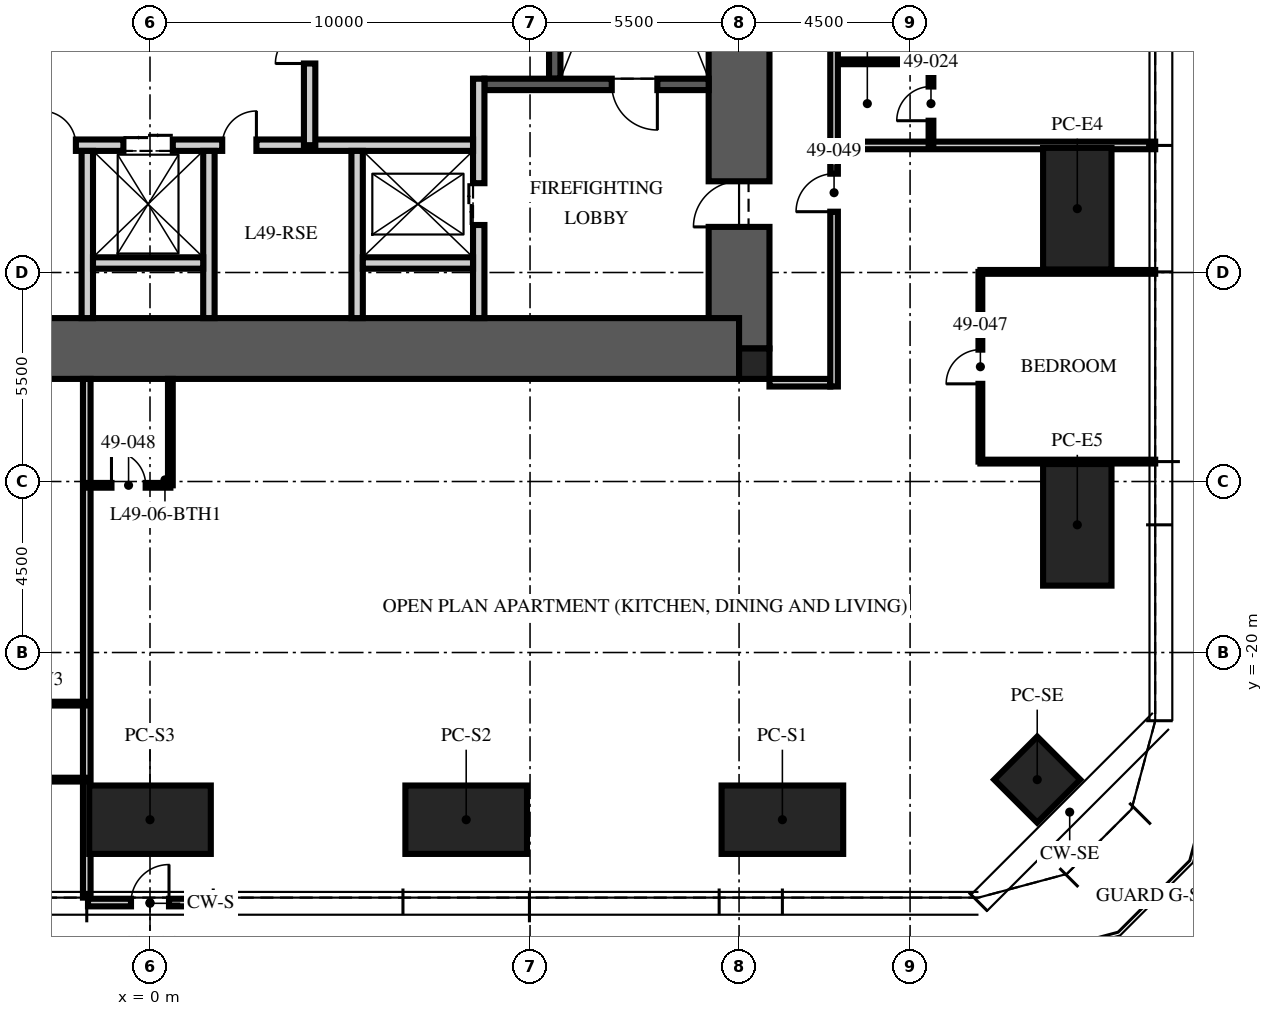
"""IFC4 building model, lengths in metres.
Left out: names, types, materials, properties, quantities, classifications, styles, units other than length and angle.
Written with IfcOpenShell. Run it as: python <this file> out.ifc"""

import sys

from ifc_helpers import new_model, si_unit, direction, frame, frame_2d, origin, origin_2d, place, context, subcontext, project, spatial, rectangle, hollow_rectangle, extrude, element, fill, save


model = new_model("IFC4")
c1 = context("Model", 3, precision=1e-05, world=origin(), true_north=direction((0.0, 1.0)))
c2 = subcontext(c1, "Body", "Model", "MODEL_VIEW")
j1 = project(units=[si_unit("LENGTHUNIT", "METRE"), si_unit("PLANEANGLEUNIT", "RADIAN")], contexts=[c1])
p1 = place(None, origin())
s1 = spatial("IfcSite", under=j1, at=p1, CompositionType="ELEMENT")
p2 = place(p1, origin())
s2 = spatial("IfcBuilding", under=s1, at=p2, CompositionType="ELEMENT")
p3 = place(p2, frame((0.0, 0.0, 199.5)))
s3 = spatial("IfcBuildingStorey", under=s2, at=p3, CompositionType="ELEMENT", Elevation=199.5)
p4 = place(p3, frame((15.5, -12.0, -0.25), z_axis=(0.0, 0.0, 1.0), x_axis=(0.0, 1.0, 0.0)))
e1 = element("IfcWall", 1, at=p4, inside=s3, PredefinedType="SHEAR", context=c2, shape_type="SweptSolid", body=[
    extrude(rectangle(XDim=24.0, YDim=1.6, at=frame_2d((12.0, 0.0))), origin(), (0.0, 0.0, 1.0), 3.75),
])
p5 = place(p4, frame((3.2, 0.0, 0.25)))
e2 = element("IfcOpeningElement", 2, at=p5, cuts=e1, PredefinedType="OPENING", context=c2, shape_type="SweptSolid", body=[
    extrude(rectangle(XDim=1.2, YDim=2.1, at=frame_2d((0.6, 1.05))), frame((0.0, 0.81, 0.0), z_axis=(0.0, -1.0, 0.0), x_axis=(1.0, 0.0, 0.0)), (0.0, 0.0, 1.0), 1.62),
])
p6 = place(p4, frame((19.3, 0.0, 0.25)))
e3 = element("IfcOpeningElement", 3, at=p6, cuts=e1, PredefinedType="OPENING", context=c2, shape_type="SweptSolid", body=[
    extrude(rectangle(XDim=1.8, YDim=2.1, at=frame_2d((0.9, 1.05))), frame((0.0, 0.81, 0.0), z_axis=(0.0, -1.0, 0.0), x_axis=(1.0, 0.0, 0.0)), (0.0, 0.0, 1.0), 1.62),
])
p7 = place(p3, frame((-15.5, -12.0, -0.25), z_axis=(0.0, 0.0, 1.0), x_axis=(1.0, 0.0, 0.0)))
e4 = element("IfcWall", 4, at=p7, inside=s3, PredefinedType="SHEAR", context=c2, shape_type="SweptSolid", body=[
    extrude(rectangle(XDim=31.0, YDim=1.6, at=frame_2d((15.5, 0.0))), origin(), (0.0, 0.0, 1.0), 3.75),
])
p8 = place(p3, frame((15.9, -12.4, -0.25), z_axis=(0.0, 0.0, 1.0), x_axis=(1.0, 0.0, 0.0)))
e5 = element("IfcColumn", 5, at=p8, inside=s3, PredefinedType="COLUMN", context=c2, shape_type="SweptSolid", body=[
    extrude(rectangle(XDim=0.8, YDim=0.8, at=origin_2d()), origin(), (0.0, 0.0, 1.0), 3.75),
])
p9 = place(p3, frame((24.4, -8.32, -0.07), z_axis=(0.0, 0.0, 1.0), x_axis=(0.0, 1.0, 0.0)))
e6 = element("IfcColumn", 6, at=p9, inside=s3, PredefinedType="COLUMN", context=c2, shape_type="SweptSolid", body=[
    extrude(hollow_rectangle(XDim=3.2, YDim=1.8, WallThickness=0.2, at=origin_2d()), origin(), (0.0, 0.0, 1.0), 3.82),
])
for number, where, z_axis, x_axis in (
    (7, (24.4, -16.64, 0.08), (0.0, 0.0, 1.0), (0.0, 1.0, 0.0)),
    (8, (16.64, -24.4, 0.08), (0.0, 0.0, 1.0), (1.0, 0.0, 0.0)),
):
    element("IfcColumn", number, at=place(p3, frame(where, z_axis=z_axis, x_axis=x_axis)), inside=s3, PredefinedType="COLUMN", context=c2, shape_type="SweptSolid", body=[
        extrude(hollow_rectangle(XDim=3.2, YDim=1.8, WallThickness=0.2, at=origin_2d()), origin(), (0.0, 0.0, 1.0), 3.67),
    ])
p10 = place(p3, frame((8.32, -24.4, -0.07), z_axis=(0.0, 0.0, 1.0), x_axis=(1.0, 0.0, 0.0)))
e9 = element("IfcColumn", 9, at=p10, inside=s3, PredefinedType="COLUMN", context=c2, shape_type="SweptSolid", body=[
    extrude(hollow_rectangle(XDim=3.2, YDim=1.8, WallThickness=0.2, at=origin_2d()), origin(), (0.0, 0.0, 1.0), 3.82),
])
p11 = place(p3, frame((0.0, -24.4, -0.23), z_axis=(0.0, 0.0, 1.0), x_axis=(1.0, 0.0, 0.0)))
e10 = element("IfcColumn", 10, at=p11, inside=s3, PredefinedType="COLUMN", context=c2, shape_type="SweptSolid", body=[
    extrude(hollow_rectangle(XDim=3.2, YDim=1.8, WallThickness=0.2, at=origin_2d()), origin(), (0.0, 0.0, 1.0), 3.98),
])
p12 = place(p3, frame((23.346, -23.346, -0.19), z_axis=(0.0, 0.0, 1.0), x_axis=(0.707106781187, 0.707106781187, 0.0)))
e11 = element("IfcColumn", 11, at=p12, inside=s3, PredefinedType="COLUMN", context=c2, shape_type="SweptSolid", body=[
    extrude(hollow_rectangle(XDim=1.6, YDim=1.6, WallThickness=0.1, at=origin_2d()), origin(), (0.0, 0.0, 1.0), 3.94),
])
p13 = place(p3, frame((-1.632, -26.58, 0.0), z_axis=(0.0, 0.0, 1.0), x_axis=(1.0, 0.0, 0.0)))
e12 = element("IfcWall", 12, at=p13, inside=s3, PredefinedType="ELEMENTEDWALL", context=c2, shape_type="SweptSolid", body=[
    extrude(rectangle(XDim=3.263, YDim=0.2, at=frame_2d((1.632, 0.0))), origin(), (0.0, 0.0, 1.0), 3.75),
])
p14 = place(p13, frame((1.132, 0.0, 0.0)))
e13 = element("IfcOpeningElement", 13, at=p14, cuts=e12, PredefinedType="OPENING", context=c2, shape_type="SweptSolid", body=[
    extrude(rectangle(XDim=1.0, YDim=2.4, at=frame_2d((0.5, 1.2))), frame((0.0, 0.11, 0.0), z_axis=(0.0, -1.0, 0.0), x_axis=(1.0, 0.0, 0.0)), (0.0, 0.0, 1.0), 0.22),
])
p15 = place(p3, frame((10.65, -4.9, 0.0), z_axis=(0.0, 0.0, 1.0), x_axis=(0.0, 1.0, 0.0)))
e14 = element("IfcWall", 14, at=p15, inside=s3, PredefinedType="SOLIDWALL", context=c2, shape_type="SweptSolid", body=[
    extrude(rectangle(XDim=10.1, YDim=0.3, at=frame_2d((5.05, 0.0))), origin(), (0.0, 0.0, 1.0), 3.5),
])
p16 = place(p3, frame((14.7, -5.05, 0.0), z_axis=(0.0, 0.0, 1.0), x_axis=(-1.0, 0.0, 0.0)))
e15 = element("IfcWall", 15, at=p16, inside=s3, PredefinedType="SOLIDWALL", context=c2, shape_type="SweptSolid", body=[
    extrude(rectangle(XDim=5.9, YDim=0.3, at=frame_2d((2.95, 0.0))), origin(), (0.0, 0.0, 1.0), 3.5),
])
p17 = place(p16, frame((1.35, 0.0, 0.0)))
e16 = element("IfcOpeningElement", 16, at=p17, cuts=e15, PredefinedType="OPENING", context=c2, shape_type="SweptSolid", body=[
    extrude(rectangle(XDim=1.2, YDim=2.1, at=frame_2d((0.6, 1.05))), frame((0.0, 0.16, 0.0), z_axis=(0.0, -1.0, 0.0), x_axis=(1.0, 0.0, 0.0)), (0.0, 0.0, 1.0), 0.32),
])
p18 = place(p3, frame((8.65, -11.2, 0.0), z_axis=(0.0, 0.0, 1.0), x_axis=(0.0, 1.0, 0.0)))
e17 = element("IfcWall", 17, at=p18, inside=s3, PredefinedType="PARTITIONING", context=c2, shape_type="SweptSolid", body=[
    extrude(rectangle(XDim=6.3, YDim=0.3, at=frame_2d((3.15, 0.0))), origin(), (0.0, 0.0, 1.0), 3.5),
])
p19 = place(p18, frame((2.45, 0.0, 0.0)))
e18 = element("IfcOpeningElement", 18, at=p19, cuts=e17, PredefinedType="OPENING", context=c2, shape_type="SweptSolid", body=[
    extrude(rectangle(XDim=1.1, YDim=2.1, at=frame_2d((0.55, 1.05))), frame((0.0, 0.16, 0.0), z_axis=(0.0, -1.0, 0.0), x_axis=(1.0, 0.0, 0.0)), (0.0, 0.0, 1.0), 0.32),
])
p20 = place(p3, frame((-8.5, -6.65, 0.0), z_axis=(0.0, 0.0, 1.0), x_axis=(1.0, 0.0, 0.0)))
e19 = element("IfcWall", 19, at=p20, inside=s3, PredefinedType="PARTITIONING", context=c2, shape_type="SweptSolid", body=[
    extrude(rectangle(XDim=17.0, YDim=0.3, at=frame_2d((8.5, 0.0))), origin(), (0.0, 0.0, 1.0), 3.5),
])
p21 = place(p20, frame((7.8, 0.0, 0.0)))
e20 = element("IfcOpeningElement", 20, at=p21, cuts=e19, PredefinedType="OPENING", context=c2, shape_type="SweptSolid", body=[
    extrude(rectangle(XDim=1.3, YDim=2.4, at=frame_2d((0.65, 1.2))), frame((0.0, 0.16, 0.0), z_axis=(0.0, -1.0, 0.0), x_axis=(1.0, 0.0, 0.0)), (0.0, 0.0, 1.0), 0.32),
])
p22 = place(p20, frame((5.65, 0.0, 0.0)))
e21 = element("IfcOpeningElement", 21, at=p22, cuts=e19, PredefinedType="OPENING", context=c2, shape_type="SweptSolid", body=[
    extrude(rectangle(XDim=0.9, YDim=2.1, at=frame_2d((0.45, 1.05))), frame((0.0, 0.16, 0.0), z_axis=(0.0, -1.0, 0.0), x_axis=(1.0, 0.0, 0.0)), (0.0, 0.0, 1.0), 0.32),
])
p23 = place(p20, frame((10.4, 0.0, 0.0)))
e22 = element("IfcOpeningElement", 22, at=p23, cuts=e19, PredefinedType="OPENING", context=c2, shape_type="SweptSolid", body=[
    extrude(rectangle(XDim=0.9, YDim=2.1, at=frame_2d((0.45, 1.05))), frame((0.0, 0.16, 0.0), z_axis=(0.0, -1.0, 0.0), x_axis=(1.0, 0.0, 0.0)), (0.0, 0.0, 1.0), 0.32),
])
for number, where, z_axis, x_axis in (
    (23, (-1.65, -11.2, 0.0), (0.0, 0.0, 1.0), (0.0, 1.0, 0.0)),
    (24, (1.55, -11.2, 0.0), (0.0, 0.0, 1.0), (0.0, 1.0, 0.0)),
    (25, (5.45, -11.2, 0.0), (0.0, 0.0, 1.0), (0.0, 1.0, 0.0)),
):
    element("IfcWall", number, at=place(p3, frame(where, z_axis=z_axis, x_axis=x_axis)), inside=s3, PredefinedType="PARTITIONING", context=c2, shape_type="SweptSolid", body=[
        extrude(rectangle(XDim=4.4, YDim=0.3, at=frame_2d((2.2, 0.0))), origin(), (0.0, 0.0, 1.0), 3.5),
    ])
for number, where, z_axis, x_axis in (
    (26, (-1.5, -9.75, 0.0), (0.0, 0.0, 1.0), (1.0, 0.0, 0.0)),
    (27, (5.6, -9.75, 0.0), (0.0, 0.0, 1.0), (1.0, 0.0, 0.0)),
):
    element("IfcWall", number, at=place(p3, frame(where, z_axis=z_axis, x_axis=x_axis)), inside=s3, PredefinedType="PARTITIONING", context=c2, shape_type="SweptSolid", body=[
        extrude(rectangle(XDim=2.9, YDim=0.3, at=frame_2d((1.45, 0.0))), origin(), (0.0, 0.0, 1.0), 3.5),
    ])
p24 = place(p3, frame((4.2, -6.65, 0.0), z_axis=(0.0, 0.0, 1.0), x_axis=(0.0, 1.0, 0.0)))
e28 = element("IfcWall", 28, at=p24, inside=s3, PredefinedType="PARTITIONING", context=c2, shape_type="SweptSolid", body=[
    extrude(rectangle(XDim=10.25, YDim=0.3, at=frame_2d((5.125, 0.0))), origin(), (0.0, 0.0, 1.0), 3.5),
])
p25 = place(p24, frame((2.15, 0.0, 0.0)))
e29 = element("IfcOpeningElement", 29, at=p25, cuts=e28, PredefinedType="OPENING", context=c2, shape_type="SweptSolid", body=[
    extrude(rectangle(XDim=0.9, YDim=2.1, at=frame_2d((0.45, 1.05))), frame((0.0, 0.16, 0.0), z_axis=(0.0, -1.0, 0.0), x_axis=(1.0, 0.0, 0.0)), (0.0, 0.0, 1.0), 0.32),
])
p26 = place(p24, frame((7.275, 0.0, 0.0)))
e30 = element("IfcOpeningElement", 30, at=p26, cuts=e28, PredefinedType="OPENING", context=c2, shape_type="SweptSolid", body=[
    extrude(rectangle(XDim=0.9, YDim=2.1, at=frame_2d((0.45, 1.05))), frame((0.0, 0.16, 0.0), z_axis=(0.0, -1.0, 0.0), x_axis=(1.0, 0.0, 0.0)), (0.0, 0.0, 1.0), 0.32),
])
p27 = place(p3, frame((16.3, -12.9, 0.0), z_axis=(0.0, 0.0, 1.0), x_axis=(1.0, 0.0, 0.0)))
e31 = element("IfcWall", 31, at=p27, inside=s3, PredefinedType="PARTITIONING", context=c2, shape_type="SweptSolid", body=[
    extrude(rectangle(XDim=1.6, YDim=0.2, at=frame_2d((0.8, 0.0))), origin(), (0.0, 0.0, 1.0), 2.3),
])
p28 = place(p3, frame((18.1, -6.656, 0.0), z_axis=(0.0, 0.0, 1.0), x_axis=(1.0, 0.0, 0.0)))
e32 = element("IfcWall", 32, at=p28, inside=s3, PredefinedType="PARTITIONING", context=c2, shape_type="SweptSolid", body=[
    extrude(rectangle(XDim=8.35, YDim=0.2, at=frame_2d((4.175, 0.0))), origin(), (0.0, 0.0, 1.0), 2.91),
])
p29 = place(p3, frame((-1.664, -12.8, 0.0), z_axis=(0.0, 0.0, 1.0), x_axis=(0.0, -1.0, 0.0)))
e33 = element("IfcWall", 33, at=p29, inside=s3, PredefinedType="PARTITIONING", context=c2, shape_type="SweptSolid", body=[
    extrude(rectangle(XDim=13.65, YDim=0.2, at=frame_2d((6.825, 0.0))), origin(), (0.0, 0.0, 1.0), 2.91),
])
for number, where, z_axis, x_axis in (
    (34, (21.85, -14.976, 0.0), (0.0, 0.0, 1.0), (1.0, 0.0, 0.0)),
    (35, (21.85, -9.984, 0.0), (0.0, 0.0, 1.0), (1.0, 0.0, 0.0)),
):
    element("IfcWall", number, at=place(p3, frame(where, z_axis=z_axis, x_axis=x_axis)), inside=s3, PredefinedType="PARTITIONING", context=c2, shape_type="SweptSolid", body=[
        extrude(rectangle(XDim=4.6, YDim=0.1, at=frame_2d((2.3, 0.0))), origin(), (0.0, 0.0, 1.0), 2.91),
    ])
p30 = place(p3, frame((20.55, -6.656, 0.0), z_axis=(0.0, 0.0, 1.0), x_axis=(0.0, 1.0, 0.0)))
e36 = element("IfcWall", 36, at=p30, inside=s3, PredefinedType="PARTITIONING", context=c2, shape_type="SweptSolid", body=[
    extrude(rectangle(XDim=2.2, YDim=0.125, at=frame_2d((1.1, 0.0))), origin(), (0.0, 0.0, 1.0), 3.5),
])
p31 = place(p30, frame((0.65, 0.0, 0.0)))
e37 = element("IfcOpeningElement", 37, at=p31, cuts=e36, PredefinedType="OPENING", context=c2, shape_type="SweptSolid", body=[
    extrude(rectangle(XDim=0.9, YDim=2.1, at=frame_2d((0.45, 1.05))), frame((0.0, 0.073, 0.0), z_axis=(0.0, -1.0, 0.0), x_axis=(1.0, 0.0, 0.0)), (0.0, 0.0, 1.0), 0.145),
])
p32 = place(p3, frame((18.1, -4.456, 0.0), z_axis=(0.0, 0.0, 1.0), x_axis=(1.0, 0.0, 0.0)))
e38 = element("IfcWall", 38, at=p32, inside=s3, PredefinedType="PARTITIONING", context=c2, shape_type="SweptSolid", body=[
    extrude(rectangle(XDim=2.45, YDim=0.125, at=frame_2d((1.225, 0.0))), origin(), (0.0, 0.0, 1.0), 3.5),
])
p33 = place(p3, frame((-6.656, -23.345, 0.0), z_axis=(0.0, 0.0, 1.0), x_axis=(1.0, 0.0, 0.0)))
e39 = element("IfcWall", 39, at=p33, inside=s3, PredefinedType="PARTITIONING", context=c2, shape_type="SweptSolid", body=[
    extrude(rectangle(XDim=4.992, YDim=0.1, at=frame_2d((2.496, 0.0))), origin(), (0.0, 0.0, 1.0), 2.81),
])
p34 = place(p33, frame((0.15, 0.0, 0.0)))
e40 = element("IfcOpeningElement", 40, at=p34, cuts=e39, PredefinedType="OPENING", context=c2, shape_type="SweptSolid", body=[
    extrude(rectangle(XDim=0.9, YDim=2.1, at=frame_2d((0.45, 1.05))), frame((0.0, 0.06, 0.0), z_axis=(0.0, -1.0, 0.0), x_axis=(1.0, 0.0, 0.0)), (0.0, 0.0, 1.0), 0.12),
])
p35 = place(p33, frame((2.646, 0.0, 0.0)))
e41 = element("IfcOpeningElement", 41, at=p35, cuts=e39, PredefinedType="OPENING", context=c2, shape_type="SweptSolid", body=[
    extrude(rectangle(XDim=0.9, YDim=2.1, at=frame_2d((0.45, 1.05))), frame((0.0, 0.06, 0.0), z_axis=(0.0, -1.0, 0.0), x_axis=(1.0, 0.0, 0.0)), (0.0, 0.0, 1.0), 0.12),
])
p36 = place(p3, frame((-5.456, -21.345, 0.0), z_axis=(0.0, 0.0, 1.0), x_axis=(1.0, 0.0, 0.0)))
e42 = element("IfcWall", 42, at=p36, inside=s3, PredefinedType="PARTITIONING", context=c2, shape_type="SweptSolid", body=[
    extrude(rectangle(XDim=3.792, YDim=0.1, at=frame_2d((1.896, 0.0))), origin(), (0.0, 0.0, 1.0), 2.81),
])
p37 = place(p3, frame((21.85, -14.976, 0.0), z_axis=(0.0, 0.0, 1.0), x_axis=(0.0, 1.0, 0.0)))
e43 = element("IfcWall", 43, at=p37, inside=s3, PredefinedType="PARTITIONING", context=c2, shape_type="SweptSolid", body=[
    extrude(rectangle(XDim=4.992, YDim=0.1, at=frame_2d((2.496, 0.0))), origin(), (0.0, 0.0, 1.0), 2.81),
])
p38 = place(p37, frame((2.046, 0.0, 0.0)))
e44 = element("IfcOpeningElement", 44, at=p38, cuts=e43, PredefinedType="OPENING", context=c2, shape_type="SweptSolid", body=[
    extrude(rectangle(XDim=0.9, YDim=2.1, at=frame_2d((0.45, 1.05))), frame((0.0, 0.06, 0.0), z_axis=(0.0, -1.0, 0.0), x_axis=(1.0, 0.0, 0.0)), (0.0, 0.0, 1.0), 0.12),
])
p39 = place(p3, frame((-1.664, -15.6, 0.0), z_axis=(0.0, 0.0, 1.0), x_axis=(1.0, 0.0, 0.0)))
e45 = element("IfcWall", 45, at=p39, inside=s3, PredefinedType="PARTITIONING", context=c2, shape_type="SweptSolid", body=[
    extrude(rectangle(XDim=2.2, YDim=0.125, at=frame_2d((1.1, 0.0))), origin(), (0.0, 0.0, 1.0), 2.6),
])
p40 = place(p39, frame((0.65, 0.0, 0.0)))
e46 = element("IfcOpeningElement", 46, at=p40, cuts=e45, PredefinedType="OPENING", context=c2, shape_type="SweptSolid", body=[
    extrude(rectangle(XDim=0.9, YDim=2.1, at=frame_2d((0.45, 1.05))), frame((0.0, 0.073, 0.0), z_axis=(0.0, -1.0, 0.0), x_axis=(1.0, 0.0, 0.0)), (0.0, 0.0, 1.0), 0.145),
])
p41 = place(p3, frame((0.536, -12.8, 0.0), z_axis=(0.0, 0.0, 1.0), x_axis=(0.0, -1.0, 0.0)))
e47 = element("IfcWall", 47, at=p41, inside=s3, PredefinedType="PARTITIONING", context=c2, shape_type="SweptSolid", body=[
    extrude(rectangle(XDim=2.8, YDim=0.125, at=frame_2d((1.4, 0.0))), origin(), (0.0, 0.0, 1.0), 3.5),
])
p42 = place(p3, frame((18.0, -13.0, 0.0), z_axis=(0.0, 0.0, 1.0), x_axis=(0.0, 1.0, 0.0)))
e48 = element("IfcWall", 48, at=p42, inside=s3, PredefinedType="PARTITIONING", context=c2, shape_type="SweptSolid", body=[
    extrude(rectangle(XDim=26.0, YDim=0.2, at=frame_2d((13.0, 0.0))), origin(), (0.0, 0.0, 1.0), 2.6),
])
p43 = place(p42, frame((21.364, 0.0, 0.0)))
e49 = element("IfcOpeningElement", 49, at=p43, cuts=e48, PredefinedType="OPENING", context=c2, shape_type="SweptSolid", body=[
    extrude(rectangle(XDim=1.0, YDim=2.2, at=frame_2d((0.5, 1.1))), frame((0.0, 0.11, 0.0), z_axis=(0.0, -1.0, 0.0), x_axis=(1.0, 0.0, 0.0)), (0.0, 0.0, 1.0), 0.22),
])
p44 = place(p42, frame((23.754, 0.0, 0.0)))
e50 = element("IfcOpeningElement", 50, at=p44, cuts=e48, PredefinedType="OPENING", context=c2, shape_type="SweptSolid", body=[
    extrude(rectangle(XDim=1.0, YDim=2.2, at=frame_2d((0.5, 1.1))), frame((0.0, 0.11, 0.0), z_axis=(0.0, -1.0, 0.0), x_axis=(1.0, 0.0, 0.0)), (0.0, 0.0, 1.0), 0.22),
])
p45 = place(p42, frame((4.6, 0.0, 0.0)))
e51 = element("IfcOpeningElement", 51, at=p45, cuts=e48, PredefinedType="OPENING", context=c2, shape_type="SweptSolid", body=[
    extrude(rectangle(XDim=1.0, YDim=2.2, at=frame_2d((0.5, 1.1))), frame((0.0, 0.11, 0.0), z_axis=(0.0, -1.0, 0.0), x_axis=(1.0, 0.0, 0.0)), (0.0, 0.0, 1.0), 0.22),
])
p46 = place(p14, origin())
e52 = element("IfcDoor", 52, at=p46, inside=s3, OperationType="SINGLE_SWING_LEFT", PredefinedType="DOOR", context=c2, shape_type="SweptSolid", body=[
    extrude(rectangle(XDim=1.0, YDim=2.4, at=frame_2d((0.5, 1.2))), frame((0.0, 0.025, 0.0), z_axis=(0.0, -1.0, 0.0), x_axis=(1.0, 0.0, 0.0)), (0.0, 0.0, 1.0), 0.05),
])
fill(e13, e52)
p47 = place(p17, origin())
e53 = element("IfcDoor", 53, at=p47, inside=s3, OperationType="SINGLE_SWING_LEFT", PredefinedType="DOOR", context=c2, shape_type="SweptSolid", body=[
    extrude(rectangle(XDim=1.2, YDim=2.1, at=frame_2d((0.6, 1.05))), frame((0.0, 0.025, 0.0), z_axis=(0.0, -1.0, 0.0), x_axis=(1.0, 0.0, 0.0)), (0.0, 0.0, 1.0), 0.05),
])
fill(e16, e53)
p48 = place(p5, origin())
e54 = element("IfcDoor", 54, at=p48, inside=s3, OperationType="SINGLE_SWING_LEFT", PredefinedType="DOOR", context=c2, shape_type="SweptSolid", body=[
    extrude(rectangle(XDim=1.2, YDim=2.1, at=frame_2d((0.6, 1.05))), frame((0.0, 0.025, 0.0), z_axis=(0.0, -1.0, 0.0), x_axis=(1.0, 0.0, 0.0)), (0.0, 0.0, 1.0), 0.05),
])
fill(e2, e54)
p49 = place(p19, origin())
e55 = element("IfcDoor", 55, at=p49, inside=s3, OperationType="DOUBLE_DOOR_SLIDING", PredefinedType="DOOR", context=c2, shape_type="SweptSolid", body=[
    extrude(rectangle(XDim=1.1, YDim=2.1, at=frame_2d((0.55, 1.05))), frame((0.0, 0.025, 0.0), z_axis=(0.0, -1.0, 0.0), x_axis=(1.0, 0.0, 0.0)), (0.0, 0.0, 1.0), 0.05),
])
fill(e18, e55)
p50 = place(p21, origin())
e56 = element("IfcDoor", 56, at=p50, inside=s3, OperationType="DOUBLE_DOOR_SLIDING", PredefinedType="DOOR", context=c2, shape_type="SweptSolid", body=[
    extrude(rectangle(XDim=1.3, YDim=2.4, at=frame_2d((0.65, 1.2))), frame((0.0, 0.025, 0.0), z_axis=(0.0, -1.0, 0.0), x_axis=(1.0, 0.0, 0.0)), (0.0, 0.0, 1.0), 0.05),
])
fill(e20, e56)
p51 = place(p22, origin())
e57 = element("IfcDoor", 57, at=p51, inside=s3, OperationType="SINGLE_SWING_LEFT", PredefinedType="DOOR", context=c2, shape_type="SweptSolid", body=[
    extrude(rectangle(XDim=0.9, YDim=2.1, at=frame_2d((0.45, 1.05))), frame((0.0, 0.025, 0.0), z_axis=(0.0, -1.0, 0.0), x_axis=(1.0, 0.0, 0.0)), (0.0, 0.0, 1.0), 0.05),
])
fill(e21, e57)
p52 = place(p23, origin())
e58 = element("IfcDoor", 58, at=p52, inside=s3, OperationType="SINGLE_SWING_RIGHT", PredefinedType="DOOR", context=c2, shape_type="SweptSolid", body=[
    extrude(rectangle(XDim=0.9, YDim=2.1, at=frame_2d((0.45, 1.05))), frame((0.0, 0.025, 0.0), z_axis=(0.0, -1.0, 0.0), x_axis=(1.0, 0.0, 0.0)), (0.0, 0.0, 1.0), 0.05),
])
fill(e22, e58)
p53 = place(p25, origin())
e59 = element("IfcDoor", 59, at=p53, inside=s3, OperationType="SINGLE_SWING_LEFT", PredefinedType="DOOR", context=c2, shape_type="SweptSolid", body=[
    extrude(rectangle(XDim=0.9, YDim=2.1, at=frame_2d((0.45, 1.05))), frame((0.0, 0.025, 0.0), z_axis=(0.0, -1.0, 0.0), x_axis=(1.0, 0.0, 0.0)), (0.0, 0.0, 1.0), 0.05),
])
fill(e29, e59)
p54 = place(p31, origin())
e60 = element("IfcDoor", 60, at=p54, inside=s3, OperationType="SINGLE_SWING_LEFT", PredefinedType="DOOR", context=c2, shape_type="SweptSolid", body=[
    extrude(rectangle(XDim=0.9, YDim=2.1, at=frame_2d((0.45, 1.05))), frame((0.0, 0.025, 0.0), z_axis=(0.0, -1.0, 0.0), x_axis=(1.0, 0.0, 0.0)), (0.0, 0.0, 1.0), 0.05),
])
fill(e37, e60)
p55 = place(p38, origin())
e61 = element("IfcDoor", 61, at=p55, inside=s3, OperationType="SINGLE_SWING_LEFT", PredefinedType="DOOR", context=c2, shape_type="SweptSolid", body=[
    extrude(rectangle(XDim=0.9, YDim=2.1, at=frame_2d((0.45, 1.05))), frame((0.0, 0.025, 0.0), z_axis=(0.0, -1.0, 0.0), x_axis=(1.0, 0.0, 0.0)), (0.0, 0.0, 1.0), 0.05),
])
fill(e44, e61)
p56 = place(p40, origin())
e62 = element("IfcDoor", 62, at=p56, inside=s3, OperationType="SINGLE_SWING_LEFT", PredefinedType="DOOR", context=c2, shape_type="SweptSolid", body=[
    extrude(rectangle(XDim=0.9, YDim=2.1, at=frame_2d((0.45, 1.05))), frame((0.0, 0.025, 0.0), z_axis=(0.0, -1.0, 0.0), x_axis=(1.0, 0.0, 0.0)), (0.0, 0.0, 1.0), 0.05),
])
fill(e46, e62)
p57 = place(p45, origin())
e63 = element("IfcDoor", 63, at=p57, inside=s3, OperationType="SINGLE_SWING_LEFT", PredefinedType="DOOR", context=c2, shape_type="SweptSolid", body=[
    extrude(rectangle(XDim=1.0, YDim=2.2, at=frame_2d((0.5, 1.1))), frame((0.0, 0.025, 0.0), z_axis=(0.0, -1.0, 0.0), x_axis=(1.0, 0.0, 0.0)), (0.0, 0.0, 1.0), 0.05),
])
fill(e51, e63)
save(model, sys.argv[1])
